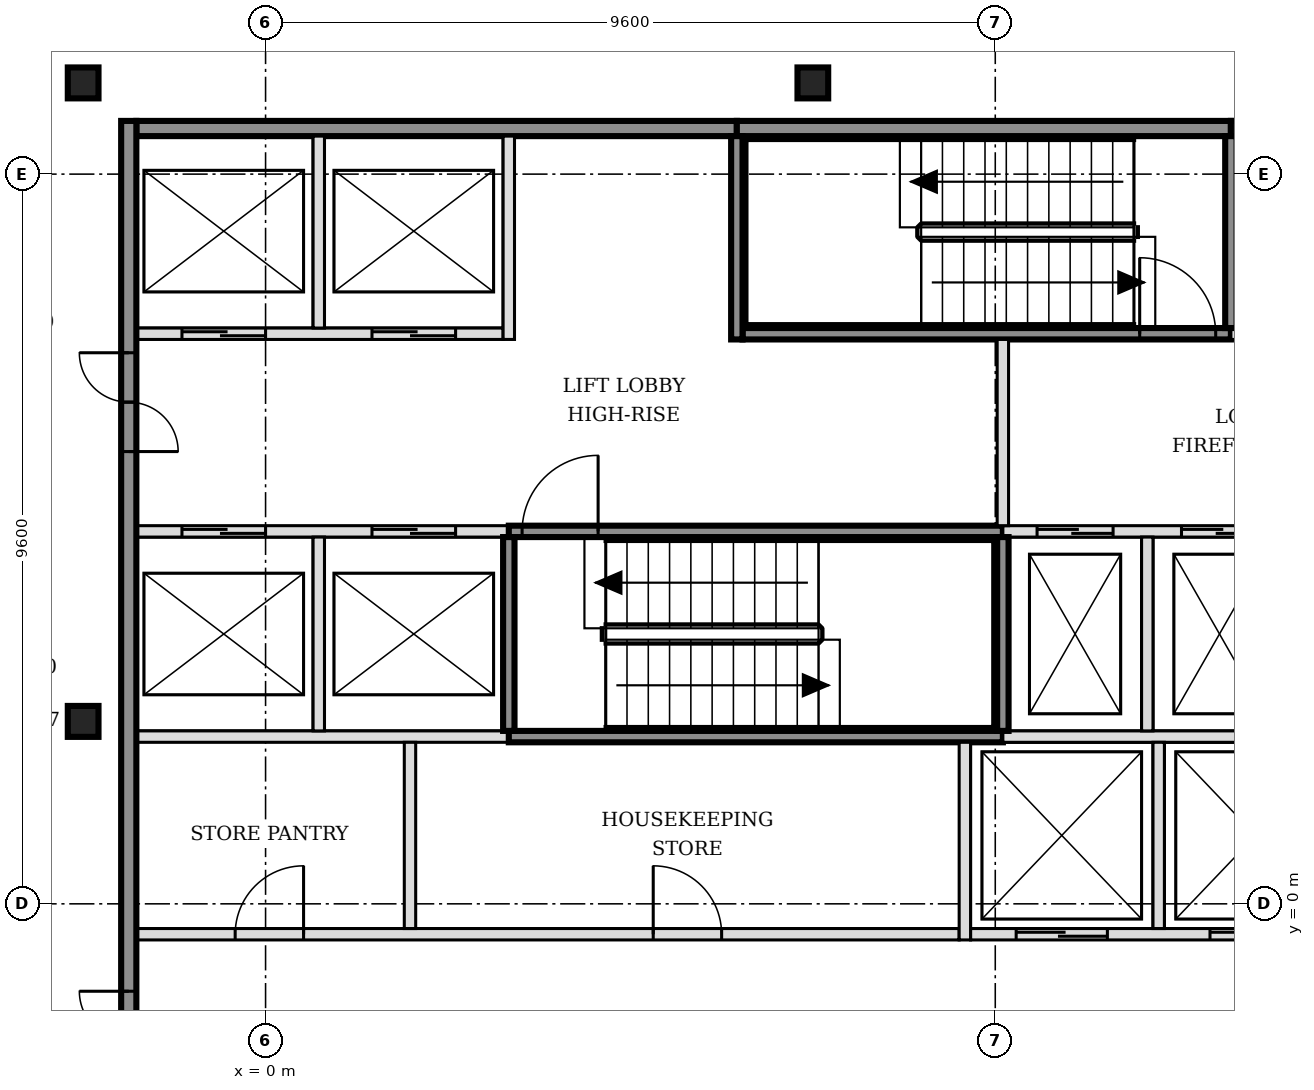
"""IFC4 building model, lengths in metres.
Left out: names, types, materials, properties, quantities, classifications, styles, units other than length and angle.
Written with IfcOpenShell. Run it as: python <this file> out.ifc"""

import sys

from ifc_helpers import new_model, si_unit, direction, frame, frame_2d, origin, origin_2d, place, context, subcontext, project, spatial, rectangle, i_section, extrude, element, fill, save


model = new_model("IFC4")
c1 = context("Model", 3, precision=1e-05, world=origin(), true_north=direction((0.0, 1.0)))
c2 = subcontext(c1, "Body", "Model", "MODEL_VIEW")
j1 = project(units=[si_unit("LENGTHUNIT", "METRE"), si_unit("PLANEANGLEUNIT", "RADIAN")], contexts=[c1])
p1 = place(None, origin())
s1 = spatial("IfcSite", under=j1, at=p1, CompositionType="ELEMENT")
p2 = place(p1, origin())
s2 = spatial("IfcBuilding", under=s1, at=p2, CompositionType="ELEMENT")
p3 = place(p2, frame((0.0, 0.0, 228.6)))
s3 = spatial("IfcBuildingStorey", under=s2, at=p3, CompositionType="ELEMENT", Elevation=228.6)
for number, where, z_axis, x_axis in (
    (1, (-2.4, 2.4, -0.15), (0.0, 0.0, 1.0), (1.0, 0.0, 0.0)),
    (2, (-2.4, 10.8, -0.15), (0.0, 0.0, 1.0), (1.0, 0.0, 0.0)),
    (3, (7.2, 10.8, -0.15), (0.0, 0.0, 1.0), (1.0, 0.0, 0.0)),
):
    element("IfcColumn", number, at=place(p3, frame(where, z_axis=z_axis, x_axis=x_axis)), inside=s3, PredefinedType="COLUMN", context=c2, shape_type="SweptSolid", body=[
        extrude(i_section(OverallWidth=0.404, OverallDepth=0.407, WebThickness=0.027, FlangeThickness=0.044, FilletRadius=0.015, at=origin_2d()), origin(), (0.0, 0.0, 1.0), 3.6),
    ])
p4 = place(p3, frame((-1.7, -0.4, 0.0), z_axis=(0.0, 0.0, 1.0), x_axis=(1.0, 0.0, 0.0)))
e4 = element("IfcWall", 4, at=p4, inside=s3, PredefinedType="PARTITIONING", context=c2, shape_type="SweptSolid", body=[
    extrude(rectangle(XDim=10.825, YDim=0.15, at=frame_2d((5.413, 0.0))), origin(), (0.0, 0.0, 1.0), 3.45),
])
p5 = place(p4, frame((1.3, 0.0, 0.0)))
e5 = element("IfcOpeningElement", 5, at=p5, cuts=e4, PredefinedType="OPENING", context=c2, shape_type="SweptSolid", body=[
    extrude(rectangle(XDim=0.9, YDim=2.1, at=frame_2d((0.45, 1.05))), frame((0.0, 0.085, 0.0), z_axis=(0.0, -1.0, 0.0), x_axis=(1.0, 0.0, 0.0)), (0.0, 0.0, 1.0), 0.17),
])
p6 = place(p4, frame((6.8, 0.0, 0.0)))
e6 = element("IfcOpeningElement", 6, at=p6, cuts=e4, PredefinedType="OPENING", context=c2, shape_type="SweptSolid", body=[
    extrude(rectangle(XDim=0.9, YDim=2.1, at=frame_2d((0.45, 1.05))), frame((0.0, 0.085, 0.0), z_axis=(0.0, -1.0, 0.0), x_axis=(1.0, 0.0, 0.0)), (0.0, 0.0, 1.0), 0.17),
])
p7 = place(p3, frame((9.275, -0.4, 0.0), z_axis=(0.0, 0.0, 1.0), x_axis=(1.0, 0.0, 0.0)))
e7 = element("IfcWall", 7, at=p7, inside=s3, PredefinedType="SOLIDWALL", context=c2, shape_type="SweptSolid", body=[
    extrude(rectangle(XDim=4.95, YDim=0.15, at=frame_2d((2.475, 0.0))), origin(), (0.0, 0.0, 1.0), 3.45),
])
p8 = place(p7, frame((0.6, 0.0, 0.0)))
e8 = element("IfcOpeningElement", 8, at=p8, cuts=e7, PredefinedType="OPENING", context=c2, shape_type="SweptSolid", body=[
    extrude(rectangle(XDim=1.2, YDim=2.1, at=frame_2d((0.6, 1.05))), frame((0.0, 0.085, 0.0), z_axis=(0.0, -1.0, 0.0), x_axis=(1.0, 0.0, 0.0)), (0.0, 0.0, 1.0), 0.17),
])
p9 = place(p7, frame((3.15, 0.0, 0.0)))
e9 = element("IfcOpeningElement", 9, at=p9, cuts=e7, PredefinedType="OPENING", context=c2, shape_type="SweptSolid", body=[
    extrude(rectangle(XDim=1.2, YDim=2.1, at=frame_2d((0.6, 1.05))), frame((0.0, 0.085, 0.0), z_axis=(0.0, -1.0, 0.0), x_axis=(1.0, 0.0, 0.0)), (0.0, 0.0, 1.0), 0.17),
])
p10 = place(p3, frame((-1.7, 2.2, 0.0), z_axis=(0.0, 0.0, 1.0), x_axis=(1.0, 0.0, 0.0)))
e10 = element("IfcWall", 10, at=p10, inside=s3, PredefinedType="SOLIDWALL", context=c2, shape_type="SweptSolid", body=[
    extrude(rectangle(XDim=4.9, YDim=0.15, at=frame_2d((2.45, 0.0))), origin(), (0.0, 0.0, 1.0), 3.45),
])
p11 = place(p3, frame((3.2, 2.2, 0.0), z_axis=(0.0, 0.0, 1.0), x_axis=(1.0, 0.0, 0.0)))
e11 = element("IfcWall", 11, at=p11, inside=s3, PredefinedType="SOLIDWALL", context=c2, shape_type="SweptSolid", body=[
    extrude(rectangle(XDim=6.5, YDim=0.15, at=frame_2d((3.25, 0.0))), origin(), (0.0, 0.0, 1.0), 3.45),
])
p12 = place(p3, frame((9.7, 2.2, 0.0), z_axis=(0.0, 0.0, 1.0), x_axis=(1.0, 0.0, 0.0)))
e12 = element("IfcWall", 12, at=p12, inside=s3, PredefinedType="SOLIDWALL", context=c2, shape_type="SweptSolid", body=[
    extrude(rectangle(XDim=4.525, YDim=0.15, at=frame_2d((2.263, 0.0))), origin(), (0.0, 0.0, 1.0), 3.45),
])
p13 = place(p3, frame((-1.7, 4.9, 0.0), z_axis=(0.0, 0.0, 1.0), x_axis=(1.0, 0.0, 0.0)))
e13 = element("IfcWall", 13, at=p13, inside=s3, PredefinedType="SOLIDWALL", context=c2, shape_type="SweptSolid", body=[
    extrude(rectangle(XDim=4.9, YDim=0.15, at=frame_2d((2.45, 0.0))), origin(), (0.0, 0.0, 1.0), 3.45),
])
p14 = place(p13, frame((0.6, 0.0, 0.0)))
e14 = element("IfcOpeningElement", 14, at=p14, cuts=e13, PredefinedType="OPENING", context=c2, shape_type="SweptSolid", body=[
    extrude(rectangle(XDim=1.1, YDim=2.1, at=frame_2d((0.55, 1.05))), frame((0.0, 0.085, 0.0), z_axis=(0.0, -1.0, 0.0), x_axis=(1.0, 0.0, 0.0)), (0.0, 0.0, 1.0), 0.17),
])
p15 = place(p13, frame((3.1, 0.0, 0.0)))
e15 = element("IfcOpeningElement", 15, at=p15, cuts=e13, PredefinedType="OPENING", context=c2, shape_type="SweptSolid", body=[
    extrude(rectangle(XDim=1.1, YDim=2.1, at=frame_2d((0.55, 1.05))), frame((0.0, 0.085, 0.0), z_axis=(0.0, -1.0, 0.0), x_axis=(1.0, 0.0, 0.0)), (0.0, 0.0, 1.0), 0.17),
])
p16 = place(p3, frame((3.2, 4.9, 0.0), z_axis=(0.0, 0.0, 1.0), x_axis=(1.0, 0.0, 0.0)))
e16 = element("IfcWall", 16, at=p16, inside=s3, PredefinedType="SOLIDWALL", context=c2, shape_type="SweptSolid", body=[
    extrude(rectangle(XDim=6.5, YDim=0.15, at=frame_2d((3.25, 0.0))), origin(), (0.0, 0.0, 1.0), 3.45),
])
p17 = place(p16, frame((0.175, 0.0, 0.0)))
e17 = element("IfcOpeningElement", 17, at=p17, cuts=e16, PredefinedType="OPENING", context=c2, shape_type="SweptSolid", body=[
    extrude(rectangle(XDim=1.0, YDim=2.1, at=frame_2d((0.5, 1.05))), frame((0.0, 0.085, 0.0), z_axis=(0.0, -1.0, 0.0), x_axis=(1.0, 0.0, 0.0)), (0.0, 0.0, 1.0), 0.17),
])
p18 = place(p3, frame((9.7, 4.9, 0.0), z_axis=(0.0, 0.0, 1.0), x_axis=(1.0, 0.0, 0.0)))
e18 = element("IfcWall", 18, at=p18, inside=s3, PredefinedType="SOLIDWALL", context=c2, shape_type="SweptSolid", body=[
    extrude(rectangle(XDim=6.4, YDim=0.15, at=frame_2d((3.2, 0.0))), origin(), (0.0, 0.0, 1.0), 3.45),
])
p19 = place(p18, frame((0.45, 0.0, 0.0)))
e19 = element("IfcOpeningElement", 19, at=p19, cuts=e18, PredefinedType="OPENING", context=c2, shape_type="SweptSolid", body=[
    extrude(rectangle(XDim=1.0, YDim=2.1, at=frame_2d((0.5, 1.05))), frame((0.0, 0.085, 0.0), z_axis=(0.0, -1.0, 0.0), x_axis=(1.0, 0.0, 0.0)), (0.0, 0.0, 1.0), 0.17),
])
p20 = place(p18, frame((2.35, 0.0, 0.0)))
e20 = element("IfcOpeningElement", 20, at=p20, cuts=e18, PredefinedType="OPENING", context=c2, shape_type="SweptSolid", body=[
    extrude(rectangle(XDim=1.0, YDim=2.1, at=frame_2d((0.5, 1.05))), frame((0.0, 0.085, 0.0), z_axis=(0.0, -1.0, 0.0), x_axis=(1.0, 0.0, 0.0)), (0.0, 0.0, 1.0), 0.17),
])
p21 = place(p18, frame((4.7, 0.0, 0.0)))
e21 = element("IfcOpeningElement", 21, at=p21, cuts=e18, PredefinedType="OPENING", context=c2, shape_type="SweptSolid", body=[
    extrude(rectangle(XDim=0.9, YDim=2.1, at=frame_2d((0.45, 1.05))), frame((0.0, 0.085, 0.0), z_axis=(0.0, -1.0, 0.0), x_axis=(1.0, 0.0, 0.0)), (0.0, 0.0, 1.0), 0.17),
])
p22 = place(p3, frame((-1.7, 7.5, 0.0), z_axis=(0.0, 0.0, 1.0), x_axis=(1.0, 0.0, 0.0)))
e22 = element("IfcWall", 22, at=p22, inside=s3, PredefinedType="SOLIDWALL", context=c2, shape_type="SweptSolid", body=[
    extrude(rectangle(XDim=4.825, YDim=0.15, at=frame_2d((2.413, 0.0))), origin(), (0.0, 0.0, 1.0), 3.45),
])
p23 = place(p22, frame((0.6, 0.0, 0.0)))
e23 = element("IfcOpeningElement", 23, at=p23, cuts=e22, PredefinedType="OPENING", context=c2, shape_type="SweptSolid", body=[
    extrude(rectangle(XDim=1.1, YDim=2.1, at=frame_2d((0.55, 1.05))), frame((0.0, 0.085, 0.0), z_axis=(0.0, -1.0, 0.0), x_axis=(1.0, 0.0, 0.0)), (0.0, 0.0, 1.0), 0.17),
])
p24 = place(p22, frame((3.1, 0.0, 0.0)))
e24 = element("IfcOpeningElement", 24, at=p24, cuts=e22, PredefinedType="OPENING", context=c2, shape_type="SweptSolid", body=[
    extrude(rectangle(XDim=1.1, YDim=2.1, at=frame_2d((0.55, 1.05))), frame((0.0, 0.085, 0.0), z_axis=(0.0, -1.0, 0.0), x_axis=(1.0, 0.0, 0.0)), (0.0, 0.0, 1.0), 0.17),
])
p25 = place(p3, frame((6.275, 7.5, 0.0), z_axis=(0.0, 0.0, 1.0), x_axis=(1.0, 0.0, 0.0)))
e25 = element("IfcWall", 25, at=p25, inside=s3, PredefinedType="SOLIDWALL", context=c2, shape_type="SweptSolid", body=[
    extrude(rectangle(XDim=6.425, YDim=0.15, at=frame_2d((3.212, 0.0))), origin(), (0.0, 0.0, 1.0), 3.45),
])
p26 = place(p25, frame((5.225, 0.0, 0.0)))
e26 = element("IfcOpeningElement", 26, at=p26, cuts=e25, PredefinedType="OPENING", context=c2, shape_type="SweptSolid", body=[
    extrude(rectangle(XDim=1.0, YDim=2.1, at=frame_2d((0.5, 1.05))), frame((0.0, 0.085, 0.0), z_axis=(0.0, -1.0, 0.0), x_axis=(1.0, 0.0, 0.0)), (0.0, 0.0, 1.0), 0.17),
])
p27 = place(p3, frame((12.7, 7.5, 0.0), z_axis=(0.0, 0.0, 1.0), x_axis=(1.0, 0.0, 0.0)))
e27 = element("IfcWall", 27, at=p27, inside=s3, PredefinedType="SOLIDWALL", context=c2, shape_type="SweptSolid", body=[
    extrude(rectangle(XDim=3.4, YDim=0.15, at=frame_2d((1.7, 0.0))), origin(), (0.0, 0.0, 1.0), 3.45),
])
p28 = place(p27, frame((1.3, 0.0, 0.0)))
e28 = element("IfcOpeningElement", 28, at=p28, cuts=e27, PredefinedType="OPENING", context=c2, shape_type="SweptSolid", body=[
    extrude(rectangle(XDim=0.9, YDim=2.1, at=frame_2d((0.45, 1.05))), frame((0.0, 0.085, 0.0), z_axis=(0.0, -1.0, 0.0), x_axis=(1.0, 0.0, 0.0)), (0.0, 0.0, 1.0), 0.17),
])
p29 = place(p3, frame((-1.7, 10.2, 0.0), z_axis=(0.0, 0.0, 1.0), x_axis=(1.0, 0.0, 0.0)))
e29 = element("IfcWall", 29, at=p29, inside=s3, PredefinedType="SOLIDWALL", context=c2, shape_type="SweptSolid", body=[
    extrude(rectangle(XDim=7.9, YDim=0.2, at=frame_2d((3.95, 0.0))), origin(), (0.0, 0.0, 1.0), 3.45),
])
p30 = place(p3, frame((6.2, 10.2, 0.0), z_axis=(0.0, 0.0, 1.0), x_axis=(1.0, 0.0, 0.0)))
e30 = element("IfcWall", 30, at=p30, inside=s3, PredefinedType="SOLIDWALL", context=c2, shape_type="SweptSolid", body=[
    extrude(rectangle(XDim=6.5, YDim=0.2, at=frame_2d((3.25, 0.0))), origin(), (0.0, 0.0, 1.0), 3.45),
])
p31 = place(p3, frame((12.7, 10.2, 0.0), z_axis=(0.0, 0.0, 1.0), x_axis=(1.0, 0.0, 0.0)))
e31 = element("IfcWall", 31, at=p31, inside=s3, PredefinedType="SOLIDWALL", context=c2, shape_type="SweptSolid", body=[
    extrude(rectangle(XDim=3.4, YDim=0.2, at=frame_2d((1.7, 0.0))), origin(), (0.0, 0.0, 1.0), 3.45),
])
p32 = place(p3, frame((-1.8, -5.5, 0.0), z_axis=(0.0, 0.0, 1.0), x_axis=(0.0, 1.0, 0.0)))
e32 = element("IfcWall", 32, at=p32, inside=s3, PredefinedType="SOLIDWALL", context=c2, shape_type="SweptSolid", body=[
    extrude(rectangle(XDim=15.8, YDim=0.2, at=frame_2d((7.9, 0.0))), origin(), (0.0, 0.0, 1.0), 3.45),
])
p33 = place(p32, frame((3.05, 0.0, 0.0)))
e33 = element("IfcOpeningElement", 33, at=p33, cuts=e32, PredefinedType="OPENING", context=c2, shape_type="SweptSolid", body=[
    extrude(rectangle(XDim=1.3, YDim=2.1, at=frame_2d((0.65, 1.05))), frame((0.0, 0.11, 0.0), z_axis=(0.0, -1.0, 0.0), x_axis=(1.0, 0.0, 0.0)), (0.0, 0.0, 1.0), 0.22),
])
p34 = place(p32, frame((11.45, 0.0, 0.0)))
e34 = element("IfcOpeningElement", 34, at=p34, cuts=e32, PredefinedType="OPENING", context=c2, shape_type="SweptSolid", body=[
    extrude(rectangle(XDim=1.3, YDim=2.1, at=frame_2d((0.65, 1.05))), frame((0.0, 0.11, 0.0), z_axis=(0.0, -1.0, 0.0), x_axis=(1.0, 0.0, 0.0)), (0.0, 0.0, 1.0), 0.22),
])
p35 = place(p3, frame((0.7, 2.275, 0.0), z_axis=(0.0, 0.0, 1.0), x_axis=(0.0, 1.0, 0.0)))
e35 = element("IfcWall", 35, at=p35, inside=s3, PredefinedType="SOLIDWALL", context=c2, shape_type="SweptSolid", body=[
    extrude(rectangle(XDim=2.55, YDim=0.15, at=frame_2d((1.275, 0.0))), origin(), (0.0, 0.0, 1.0), 3.45),
])
p36 = place(p3, frame((0.7, 7.575, 0.0), z_axis=(0.0, 0.0, 1.0), x_axis=(0.0, 1.0, 0.0)))
e36 = element("IfcWall", 36, at=p36, inside=s3, PredefinedType="SOLIDWALL", context=c2, shape_type="SweptSolid", body=[
    extrude(rectangle(XDim=2.525, YDim=0.15, at=frame_2d((1.263, 0.0))), origin(), (0.0, 0.0, 1.0), 3.45),
])
p37 = place(p3, frame((1.9, -0.325, 0.0), z_axis=(0.0, 0.0, 1.0), x_axis=(0.0, 1.0, 0.0)))
e37 = element("IfcWall", 37, at=p37, inside=s3, PredefinedType="PARTITIONING", context=c2, shape_type="SweptSolid", body=[
    extrude(rectangle(XDim=2.45, YDim=0.15, at=frame_2d((1.225, 0.0))), origin(), (0.0, 0.0, 1.0), 3.45),
])
p38 = place(p3, frame((3.2, 2.275, 0.0), z_axis=(0.0, 0.0, 1.0), x_axis=(0.0, 1.0, 0.0)))
e38 = element("IfcWall", 38, at=p38, inside=s3, PredefinedType="SOLIDWALL", context=c2, shape_type="SweptSolid", body=[
    extrude(rectangle(XDim=2.55, YDim=0.15, at=frame_2d((1.275, 0.0))), origin(), (0.0, 0.0, 1.0), 3.45),
])
for number, where, z_axis, x_axis in (
    (39, (3.2, 7.425, 0.0), (0.0, 0.0, 1.0), (0.0, 1.0, 0.0)),
    (40, (6.2, 7.425, 0.0), (0.0, 0.0, 1.0), (0.0, 1.0, 0.0)),
):
    element("IfcWall", number, at=place(p3, frame(where, z_axis=z_axis, x_axis=x_axis)), inside=s3, PredefinedType="SOLIDWALL", context=c2, shape_type="SweptSolid", body=[
        extrude(rectangle(XDim=2.675, YDim=0.15, at=frame_2d((1.337, 0.0))), origin(), (0.0, 0.0, 1.0), 3.45),
    ])
p39 = place(p3, frame((9.2, -0.475, 0.0), z_axis=(0.0, 0.0, 1.0), x_axis=(0.0, 1.0, 0.0)))
e41 = element("IfcWall", 41, at=p39, inside=s3, PredefinedType="SOLIDWALL", context=c2, shape_type="SweptSolid", body=[
    extrude(rectangle(XDim=2.6, YDim=0.15, at=frame_2d((1.3, 0.0))), origin(), (0.0, 0.0, 1.0), 3.45),
])
p40 = place(p3, frame((9.7, 2.275, 0.0), z_axis=(0.0, 0.0, 1.0), x_axis=(0.0, 1.0, 0.0)))
e42 = element("IfcWall", 42, at=p40, inside=s3, PredefinedType="SOLIDWALL", context=c2, shape_type="SweptSolid", body=[
    extrude(rectangle(XDim=2.55, YDim=0.15, at=frame_2d((1.275, 0.0))), origin(), (0.0, 0.0, 1.0), 3.45),
])
p41 = place(p3, frame((9.7, 4.975, 0.0), z_axis=(0.0, 0.0, 1.0), x_axis=(0.0, 1.0, 0.0)))
e43 = element("IfcWall", 43, at=p41, inside=s3, PredefinedType="SOLIDWALL", context=c2, shape_type="SweptSolid", body=[
    extrude(rectangle(XDim=2.45, YDim=0.15, at=frame_2d((1.225, 0.0))), origin(), (0.0, 0.0, 1.0), 3.45),
])
p42 = place(p3, frame((11.6, 2.275, 0.0), z_axis=(0.0, 0.0, 1.0), x_axis=(0.0, 1.0, 0.0)))
e44 = element("IfcWall", 44, at=p42, inside=s3, PredefinedType="SOLIDWALL", context=c2, shape_type="SweptSolid", body=[
    extrude(rectangle(XDim=2.55, YDim=0.15, at=frame_2d((1.275, 0.0))), origin(), (0.0, 0.0, 1.0), 3.45),
])
p43 = place(p3, frame((11.75, -0.325, 0.0), z_axis=(0.0, 0.0, 1.0), x_axis=(0.0, 1.0, 0.0)))
e45 = element("IfcWall", 45, at=p43, inside=s3, PredefinedType="SOLIDWALL", context=c2, shape_type="SweptSolid", body=[
    extrude(rectangle(XDim=2.45, YDim=0.15, at=frame_2d((1.225, 0.0))), origin(), (0.0, 0.0, 1.0), 3.45),
])
p44 = place(p3, frame((12.7, 7.575, 0.0), z_axis=(0.0, 0.0, 1.0), x_axis=(0.0, 1.0, 0.0)))
e46 = element("IfcWall", 46, at=p44, inside=s3, PredefinedType="SOLIDWALL", context=c2, shape_type="SweptSolid", body=[
    extrude(rectangle(XDim=2.525, YDim=0.15, at=frame_2d((1.263, 0.0))), origin(), (0.0, 0.0, 1.0), 3.45),
])
p45 = place(p8, origin())
e47 = element("IfcDoor", 47, at=p45, inside=s3, OperationType="DOUBLE_DOOR_SLIDING", PredefinedType="DOOR", context=c2, shape_type="SweptSolid", body=[
    extrude(rectangle(XDim=1.2, YDim=2.1, at=frame_2d((0.6, 1.05))), frame((0.0, 0.025, 0.0), z_axis=(0.0, -1.0, 0.0), x_axis=(1.0, 0.0, 0.0)), (0.0, 0.0, 1.0), 0.05),
])
fill(e8, e47)
p46 = place(p9, origin())
e48 = element("IfcDoor", 48, at=p46, inside=s3, OperationType="DOUBLE_DOOR_SLIDING", PredefinedType="DOOR", context=c2, shape_type="SweptSolid", body=[
    extrude(rectangle(XDim=1.2, YDim=2.1, at=frame_2d((0.6, 1.05))), frame((0.0, 0.025, 0.0), z_axis=(0.0, -1.0, 0.0), x_axis=(1.0, 0.0, 0.0)), (0.0, 0.0, 1.0), 0.05),
])
fill(e9, e48)
p47 = place(p14, origin())
e49 = element("IfcDoor", 49, at=p47, inside=s3, OperationType="DOUBLE_DOOR_SLIDING", PredefinedType="DOOR", context=c2, shape_type="SweptSolid", body=[
    extrude(rectangle(XDim=1.1, YDim=2.1, at=frame_2d((0.55, 1.05))), frame((0.0, 0.025, 0.0), z_axis=(0.0, -1.0, 0.0), x_axis=(1.0, 0.0, 0.0)), (0.0, 0.0, 1.0), 0.05),
])
fill(e14, e49)
p48 = place(p15, origin())
e50 = element("IfcDoor", 50, at=p48, inside=s3, OperationType="DOUBLE_DOOR_SLIDING", PredefinedType="DOOR", context=c2, shape_type="SweptSolid", body=[
    extrude(rectangle(XDim=1.1, YDim=2.1, at=frame_2d((0.55, 1.05))), frame((0.0, 0.025, 0.0), z_axis=(0.0, -1.0, 0.0), x_axis=(1.0, 0.0, 0.0)), (0.0, 0.0, 1.0), 0.05),
])
fill(e15, e50)
p49 = place(p23, origin())
e51 = element("IfcDoor", 51, at=p49, inside=s3, OperationType="DOUBLE_DOOR_SLIDING", PredefinedType="DOOR", context=c2, shape_type="SweptSolid", body=[
    extrude(rectangle(XDim=1.1, YDim=2.1, at=frame_2d((0.55, 1.05))), frame((0.0, 0.025, 0.0), z_axis=(0.0, -1.0, 0.0), x_axis=(1.0, 0.0, 0.0)), (0.0, 0.0, 1.0), 0.05),
])
fill(e23, e51)
p50 = place(p24, origin())
e52 = element("IfcDoor", 52, at=p50, inside=s3, OperationType="DOUBLE_DOOR_SLIDING", PredefinedType="DOOR", context=c2, shape_type="SweptSolid", body=[
    extrude(rectangle(XDim=1.1, YDim=2.1, at=frame_2d((0.55, 1.05))), frame((0.0, 0.025, 0.0), z_axis=(0.0, -1.0, 0.0), x_axis=(1.0, 0.0, 0.0)), (0.0, 0.0, 1.0), 0.05),
])
fill(e24, e52)
p51 = place(p19, origin())
e53 = element("IfcDoor", 53, at=p51, inside=s3, OperationType="DOUBLE_DOOR_SLIDING", PredefinedType="DOOR", context=c2, shape_type="SweptSolid", body=[
    extrude(rectangle(XDim=1.0, YDim=2.1, at=frame_2d((0.5, 1.05))), frame((0.0, 0.025, 0.0), z_axis=(0.0, -1.0, 0.0), x_axis=(1.0, 0.0, 0.0)), (0.0, 0.0, 1.0), 0.05),
])
fill(e19, e53)
p52 = place(p20, origin())
e54 = element("IfcDoor", 54, at=p52, inside=s3, OperationType="DOUBLE_DOOR_SLIDING", PredefinedType="DOOR", context=c2, shape_type="SweptSolid", body=[
    extrude(rectangle(XDim=1.0, YDim=2.1, at=frame_2d((0.5, 1.05))), frame((0.0, 0.025, 0.0), z_axis=(0.0, -1.0, 0.0), x_axis=(1.0, 0.0, 0.0)), (0.0, 0.0, 1.0), 0.05),
])
fill(e20, e54)
p53 = place(p17, origin())
e55 = element("IfcDoor", 55, at=p53, inside=s3, OperationType="SINGLE_SWING_RIGHT", PredefinedType="DOOR", context=c2, shape_type="SweptSolid", body=[
    extrude(rectangle(XDim=1.0, YDim=2.1, at=frame_2d((0.5, 1.05))), frame((0.0, 0.025, 0.0), z_axis=(0.0, -1.0, 0.0), x_axis=(1.0, 0.0, 0.0)), (0.0, 0.0, 1.0), 0.05),
])
fill(e17, e55)
p54 = place(p26, origin())
e56 = element("IfcDoor", 56, at=p54, inside=s3, OperationType="SINGLE_SWING_LEFT", PredefinedType="DOOR", context=c2, shape_type="SweptSolid", body=[
    extrude(rectangle(XDim=1.0, YDim=2.1, at=frame_2d((0.5, 1.05))), frame((0.0, 0.025, 0.0), z_axis=(0.0, -1.0, 0.0), x_axis=(1.0, 0.0, 0.0)), (0.0, 0.0, 1.0), 0.05),
])
fill(e26, e56)
p55 = place(p33, origin())
e57 = element("IfcDoor", 57, at=p55, inside=s3, OperationType="DOUBLE_DOOR_SINGLE_SWING", PredefinedType="DOOR", context=c2, shape_type="SweptSolid", body=[
    extrude(rectangle(XDim=1.3, YDim=2.1, at=frame_2d((0.65, 1.05))), frame((0.0, 0.025, 0.0), z_axis=(0.0, -1.0, 0.0), x_axis=(1.0, 0.0, 0.0)), (0.0, 0.0, 1.0), 0.05),
])
fill(e33, e57)
p56 = place(p34, origin())
e58 = element("IfcDoor", 58, at=p56, inside=s3, OperationType="DOUBLE_DOOR_SINGLE_SWING", PredefinedType="DOOR", context=c2, shape_type="SweptSolid", body=[
    extrude(rectangle(XDim=1.3, YDim=2.1, at=frame_2d((0.65, 1.05))), frame((0.0, 0.025, 0.0), z_axis=(0.0, -1.0, 0.0), x_axis=(1.0, 0.0, 0.0)), (0.0, 0.0, 1.0), 0.05),
])
fill(e34, e58)
p57 = place(p5, origin())
e59 = element("IfcDoor", 59, at=p57, inside=s3, OperationType="SINGLE_SWING_RIGHT", PredefinedType="DOOR", context=c2, shape_type="SweptSolid", body=[
    extrude(rectangle(XDim=0.9, YDim=2.1, at=frame_2d((0.45, 1.05))), frame((0.0, 0.025, 0.0), z_axis=(0.0, -1.0, 0.0), x_axis=(1.0, 0.0, 0.0)), (0.0, 0.0, 1.0), 0.05),
])
fill(e5, e59)
p58 = place(p6, origin())
e60 = element("IfcDoor", 60, at=p58, inside=s3, OperationType="SINGLE_SWING_LEFT", PredefinedType="DOOR", context=c2, shape_type="SweptSolid", body=[
    extrude(rectangle(XDim=0.9, YDim=2.1, at=frame_2d((0.45, 1.05))), frame((0.0, 0.025, 0.0), z_axis=(0.0, -1.0, 0.0), x_axis=(1.0, 0.0, 0.0)), (0.0, 0.0, 1.0), 0.05),
])
fill(e6, e60)
save(model, sys.argv[1])
